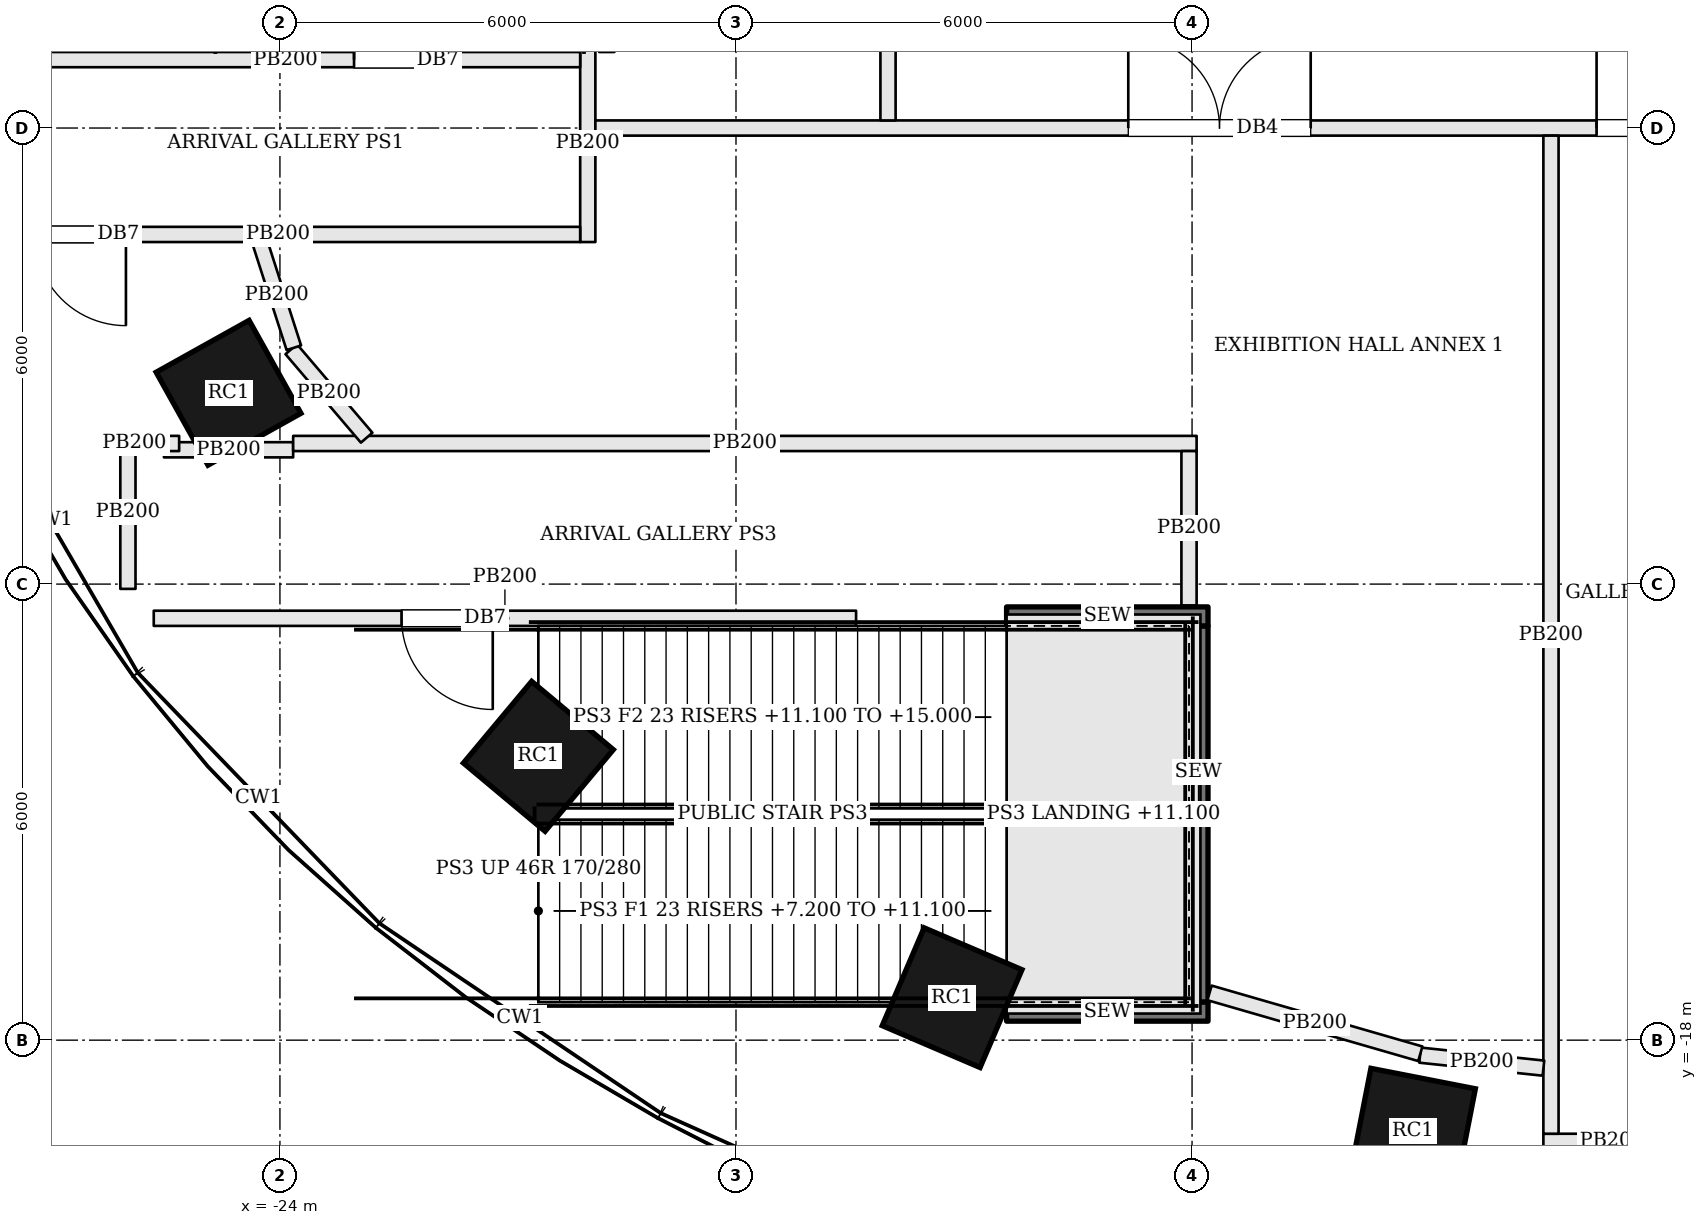
"""IFC4 building model, lengths in metres.
Left out: names, types, materials, properties, quantities, classifications, styles, units other than length and angle.
Written with IfcOpenShell. Run it as: python <this file> out.ifc"""

import sys

from ifc_helpers import new_model, si_unit, direction, frame, frame_2d, origin, origin_2d, place, context, subcontext, project, spatial, rectangle, extrude, element, fill, save


model = new_model("IFC4")
c1 = context("Model", 3, precision=1e-05, world=origin(), true_north=direction((0.0, 1.0)))
c2 = subcontext(c1, "Body", "Model", "MODEL_VIEW")
j1 = project(units=[si_unit("LENGTHUNIT", "METRE"), si_unit("PLANEANGLEUNIT", "RADIAN")], contexts=[c1])
p1 = place(None, origin())
s1 = spatial("IfcSite", under=j1, at=p1, CompositionType="ELEMENT")
p2 = place(p1, origin())
s2 = spatial("IfcBuilding", under=s1, at=p2, CompositionType="ELEMENT")
p3 = place(p2, frame((0.0, 0.0, 7.2)))
s3 = spatial("IfcBuildingStorey", under=s2, at=p3, CompositionType="ELEMENT", Elevation=7.2)
for number, where, z_axis, x_axis in (
    (1, (-24.676, -9.483, 0.0), (0.0, 0.0, 1.0), (0.487, -0.873, 0.0)),
    (2, (-20.6, -14.266, 0.0), (0.0, 0.0, 1.0), (0.767, -0.641, 0.0)),
    (3, (-15.157, -17.441, 0.0), (0.0, 0.0, 1.0), (0.919, -0.394, 0.0)),
    (4, (-9.094, -19.192, 0.0), (0.0, 0.0, 1.0), (0.981, -0.192, 0.0)),
):
    element("IfcColumn", number, at=place(p3, frame(where, z_axis=z_axis, x_axis=x_axis)), inside=s3, PredefinedType="COLUMN", context=c2, shape_type="SweptSolid", body=[
        extrude(rectangle(XDim=1.4, YDim=1.4, at=origin_2d()), origin(), (0.0, 0.0, 1.0), 7.8),
    ])
p4 = place(p3, frame((-19.95, -4.9, 0.0), z_axis=(0.0, 0.0, 1.0), x_axis=(0.0, -1.0, 0.0)))
e5 = element("IfcWall", 5, at=p4, inside=s3, PredefinedType="PARTITIONING", context=c2, shape_type="SweptSolid", body=[
    extrude(rectangle(XDim=2.6, YDim=0.2, at=frame_2d((1.3, 0.0))), origin(), (0.0, 0.0, 1.0), 6.83),
])
p5 = place(p3, frame((-20.05, -7.4, 0.0), z_axis=(0.0, 0.0, 1.0), x_axis=(-1.0, 0.0, 0.0)))
e6 = element("IfcWall", 6, at=p5, inside=s3, PredefinedType="PARTITIONING", context=c2, shape_type="SweptSolid", body=[
    extrude(rectangle(XDim=7.95, YDim=0.2, at=frame_2d((3.975, 0.0))), origin(), (0.0, 0.0, 1.0), 6.83),
])
p6 = place(p5, frame((5.976, 0.0, 0.0)))
e7 = element("IfcOpeningElement", 7, at=p6, cuts=e6, PredefinedType="OPENING", context=c2, shape_type="SweptSolid", body=[
    extrude(rectangle(XDim=1.2, YDim=2.1, at=frame_2d((0.6, 1.05))), frame((0.0, 0.11, 0.0), z_axis=(0.0, -1.0, 0.0), x_axis=(1.0, 0.0, 0.0)), (0.0, 0.0, 1.0), 0.22),
])
p7 = place(p3, frame((-27.8, -5.1, 0.0), z_axis=(0.0, 0.0, 1.0), x_axis=(1.0, 0.0, 0.0)))
e8 = element("IfcWall", 8, at=p7, inside=s3, PredefinedType="PARTITIONING", context=c2, shape_type="SweptSolid", body=[
    extrude(rectangle(XDim=7.75, YDim=0.2, at=frame_2d((3.875, 0.0))), origin(), (0.0, 0.0, 1.0), 6.83),
])
p8 = place(p7, frame((4.775, 0.0, 0.0)))
e9 = element("IfcOpeningElement", 9, at=p8, cuts=e8, PredefinedType="OPENING", context=c2, shape_type="SweptSolid", body=[
    extrude(rectangle(XDim=1.2, YDim=2.1, at=frame_2d((0.6, 1.05))), frame((0.0, 0.11, 0.0), z_axis=(0.0, -1.0, 0.0), x_axis=(1.0, 0.0, 0.0)), (0.0, 0.0, 1.0), 0.22),
])
p9 = place(p3, frame((-25.526, -10.233, 0.0), z_axis=(0.0, 0.0, 1.0), x_axis=(1.0, 0.0, 0.0)))
e10 = element("IfcWall", 10, at=p9, inside=s3, PredefinedType="PARTITIONING", context=c2, shape_type="SweptSolid", body=[
    extrude(rectangle(XDim=1.7, YDim=0.2, at=frame_2d((0.85, 0.0))), origin(), (0.0, 0.0, 1.0), 6.83),
])
p10 = place(p3, frame((-23.826, -10.15, 0.0), z_axis=(0.0, 0.0, 1.0), x_axis=(1.0, 0.0, 0.0)))
e11 = element("IfcWall", 11, at=p10, inside=s3, PredefinedType="PARTITIONING", context=c2, shape_type="SweptSolid", body=[
    extrude(rectangle(XDim=11.886, YDim=0.2, at=frame_2d((5.943, 0.0))), origin(), (0.0, 0.0, 1.0), 6.83),
])
p11 = place(p3, frame((-12.04, -10.25, 0.0), z_axis=(0.0, 0.0, 1.0), x_axis=(0.0, -1.0, 0.0)))
e12 = element("IfcWall", 12, at=p11, inside=s3, PredefinedType="PARTITIONING", context=c2, shape_type="SweptSolid", body=[
    extrude(rectangle(XDim=2.03, YDim=0.2, at=frame_2d((1.015, 0.0))), origin(), (0.0, 0.0, 1.0), 6.83),
])
p12 = place(p3, frame((-16.42, -12.45, 0.0), z_axis=(0.0, 0.0, 1.0), x_axis=(-1.0, 0.0, 0.0)))
e13 = element("IfcWall", 13, at=p12, inside=s3, PredefinedType="PARTITIONING", context=c2, shape_type="SweptSolid", body=[
    extrude(rectangle(XDim=9.24, YDim=0.2, at=frame_2d((4.62, 0.0))), origin(), (0.0, 0.0, 1.0), 6.83),
])
p13 = place(p12, frame((4.78, 0.0, 0.0)))
e14 = element("IfcOpeningElement", 14, at=p13, cuts=e13, PredefinedType="OPENING", context=c2, shape_type="SweptSolid", body=[
    extrude(rectangle(XDim=1.2, YDim=2.1, at=frame_2d((0.6, 1.05))), frame((0.0, 0.11, 0.0), z_axis=(0.0, -1.0, 0.0), x_axis=(1.0, 0.0, 0.0)), (0.0, 0.0, 1.0), 0.22),
])
p14 = place(p3, frame((-26.0, -12.063, 0.0), z_axis=(0.0, 0.0, 1.0), x_axis=(0.0, 1.0, 0.0)))
e15 = element("IfcWall", 15, at=p14, inside=s3, PredefinedType="PARTITIONING", context=c2, shape_type="SweptSolid", body=[
    extrude(rectangle(XDim=2.013, YDim=0.2, at=frame_2d((1.006, 0.0))), origin(), (0.0, 0.0, 1.0), 6.83),
])
p15 = place(p3, frame((-25.9, -10.15, 0.0), z_axis=(0.0, 0.0, 1.0), x_axis=(1.0, 0.0, 0.0)))
e16 = element("IfcWall", 16, at=p15, inside=s3, PredefinedType="PARTITIONING", context=c2, shape_type="SweptSolid", body=[
    extrude(rectangle(XDim=0.574, YDim=0.2, at=frame_2d((0.287, 0.0))), origin(), (0.0, 0.0, 1.0), 6.83),
])
p16 = place(p3, frame((-19.85, -6.0, 0.0), z_axis=(0.0, 0.0, 1.0), x_axis=(1.0, 0.0, 0.0)))
e17 = element("IfcWall", 17, at=p16, inside=s3, PredefinedType="PARTITIONING", context=c2, shape_type="SweptSolid", body=[
    extrude(rectangle(XDim=39.7, YDim=0.2, at=frame_2d((19.85, 0.0))), origin(), (0.0, 0.0, 1.0), 6.83),
])
p17 = place(p16, frame((13.172, 0.0, 0.0)))
e18 = element("IfcOpeningElement", 18, at=p17, cuts=e17, PredefinedType="OPENING", context=c2, shape_type="SweptSolid", body=[
    extrude(rectangle(XDim=1.2, YDim=2.1, at=frame_2d((0.6, 1.05))), frame((0.0, 0.11, 0.0), z_axis=(0.0, -1.0, 0.0), x_axis=(1.0, 0.0, 0.0)), (0.0, 0.0, 1.0), 0.22),
])
p18 = place(p16, frame((24.211, 0.0, 0.0)))
e19 = element("IfcOpeningElement", 19, at=p18, cuts=e17, PredefinedType="OPENING", context=c2, shape_type="SweptSolid", body=[
    extrude(rectangle(XDim=2.4, YDim=2.4, at=frame_2d((1.2, 1.2))), frame((0.0, 0.11, 0.0), z_axis=(0.0, -1.0, 0.0), x_axis=(1.0, 0.0, 0.0)), (0.0, 0.0, 1.0), 0.22),
])
p19 = place(p16, frame((7.011, 0.0, 0.0)))
e20 = element("IfcOpeningElement", 20, at=p19, cuts=e17, PredefinedType="OPENING", context=c2, shape_type="SweptSolid", body=[
    extrude(rectangle(XDim=2.4, YDim=2.4, at=frame_2d((1.2, 1.2))), frame((0.0, 0.11, 0.0), z_axis=(0.0, -1.0, 0.0), x_axis=(1.0, 0.0, 0.0)), (0.0, 0.0, 1.0), 0.22),
])
p20 = place(p3, frame((-4.978, -19.331, 0.0), z_axis=(0.0, 0.0, 1.0), x_axis=(-1.0, 0.0, 0.0)))
e21 = element("IfcWall", 21, at=p20, inside=s3, PredefinedType="PARTITIONING", context=c2, shape_type="SweptSolid", body=[
    extrude(rectangle(XDim=2.4, YDim=0.2, at=frame_2d((1.2, 0.0))), origin(), (0.0, 0.0, 1.0), 6.83),
])
p21 = place(p20, frame((0.5, 0.0, 0.0)))
e22 = element("IfcOpeningElement", 22, at=p21, cuts=e21, PredefinedType="OPENING", context=c2, shape_type="SweptSolid", body=[
    extrude(rectangle(XDim=1.2, YDim=2.1, at=frame_2d((0.6, 1.05))), frame((0.0, 0.11, 0.0), z_axis=(0.0, -1.0, 0.0), x_axis=(1.0, 0.0, 0.0)), (0.0, 0.0, 1.0), 0.22),
])
p22 = place(p3, frame((-7.278, -19.231, 0.0), z_axis=(0.0, 0.0, 1.0), x_axis=(0.0, 1.0, 0.0)))
e23 = element("IfcWall", 23, at=p22, inside=s3, PredefinedType="PARTITIONING", context=c2, shape_type="SweptSolid", body=[
    extrude(rectangle(XDim=13.131, YDim=0.2, at=frame_2d((6.565, 0.0))), origin(), (0.0, 0.0, 1.0), 6.83),
])
p23 = place(p3, frame((-16.0, 14.9, 0.0), z_axis=(0.0, 0.0, 1.0), x_axis=(0.0, -1.0, 0.0)))
e24 = element("IfcWall", 24, at=p23, inside=s3, PredefinedType="PARTITIONING", context=c2, shape_type="SweptSolid", body=[
    extrude(rectangle(XDim=20.8, YDim=0.2, at=frame_2d((10.4, 0.0))), origin(), (0.0, 0.0, 1.0), 6.83),
])
p24 = place(p23, frame((9.9, 0.0, 0.0)))
e25 = element("IfcOpeningElement", 25, at=p24, cuts=e24, PredefinedType="OPENING", context=c2, shape_type="SweptSolid", body=[
    extrude(rectangle(XDim=1.0, YDim=2.1, at=frame_2d((0.5, 1.05))), frame((0.0, 0.11, 0.0), z_axis=(0.0, -1.0, 0.0), x_axis=(1.0, 0.0, 0.0)), (0.0, 0.0, 1.0), 0.22),
])
p25 = place(p3, frame((-7.377, -18.368, 0.0), z_axis=(0.0, 0.0, 1.0), x_axis=(-0.994502173657, 0.104715932846, 0.0)))
e26 = element("IfcWall", 26, at=p25, inside=s3, PredefinedType="PARTITIONING", context=c2, shape_type="SweptSolid", body=[
    extrude(rectangle(XDim=1.632, YDim=0.2, at=frame_2d((0.816, 0.0))), origin(), (0.0, 0.0, 1.0), 6.83),
])
p26 = place(p3, frame((-8.997, -18.179, 0.0), z_axis=(0.0, 0.0, 1.0), x_axis=(-0.960718693411, 0.277524038834, 0.0)))
e27 = element("IfcWall", 27, at=p26, inside=s3, PredefinedType="PARTITIONING", context=c2, shape_type="SweptSolid", body=[
    extrude(rectangle(XDim=2.886, YDim=0.2, at=frame_2d((1.443, 0.0))), origin(), (0.0, 0.0, 1.0), 6.83),
])
p27 = place(p3, frame((-22.859, -10.074, 0.0), z_axis=(0.0, 0.0, 1.0), x_axis=(-0.648685680777, 0.761056428628, 0.0)))
e28 = element("IfcWall", 28, at=p27, inside=s3, PredefinedType="PARTITIONING", context=c2, shape_type="SweptSolid", body=[
    extrude(rectangle(XDim=1.53, YDim=0.2, at=frame_2d((0.765, 0.0))), origin(), (0.0, 0.0, 1.0), 6.83),
])
p28 = place(p3, frame((-23.817, -8.891, 0.0), z_axis=(0.0, 0.0, 1.0), x_axis=(-0.306321721395, 0.951928045076, 0.0)))
e29 = element("IfcWall", 29, at=p28, inside=s3, PredefinedType="PARTITIONING", context=c2, shape_type="SweptSolid", body=[
    extrude(rectangle(XDim=1.467, YDim=0.2, at=frame_2d((0.733, 0.0))), origin(), (0.0, 0.0, 1.0), 6.83),
])
p29 = place(p3, frame((-11.915, -17.5, 0.0), z_axis=(0.0, 0.0, 1.0), x_axis=(0.0, 1.0, 0.0)))
e30 = element("IfcWall", 30, at=p29, inside=s3, PredefinedType="SOLIDWALL", context=c2, shape_type="SweptSolid", body=[
    extrude(rectangle(XDim=4.95, YDim=0.25, at=frame_2d((2.475, 0.0))), origin(), (0.0, 0.0, 1.0), 7.55),
])
for number, where, z_axis, x_axis in (
    (31, (-14.44, -17.625, 0.0), (0.0, 0.0, 1.0), (1.0, 0.0, 0.0)),
    (32, (-14.44, -12.425, 0.0), (0.0, 0.0, 1.0), (1.0, 0.0, 0.0)),
):
    element("IfcWall", number, at=place(p3, frame(where, z_axis=z_axis, x_axis=x_axis)), inside=s3, PredefinedType="SOLIDWALL", context=c2, shape_type="SweptSolid", body=[
        extrude(rectangle(XDim=2.65, YDim=0.25, at=frame_2d((1.325, 0.0))), origin(), (0.0, 0.0, 1.0), 7.55),
    ])
p30 = place(p17, origin())
e33 = element("IfcDoor", 33, at=p30, inside=s3, OperationType="SINGLE_SWING_LEFT", PredefinedType="DOOR", context=c2, shape_type="SweptSolid", body=[
    extrude(rectangle(XDim=1.2, YDim=2.1, at=frame_2d((0.6, 1.05))), frame((0.0, 0.025, 0.0), z_axis=(0.0, -1.0, 0.0), x_axis=(1.0, 0.0, 0.0)), (0.0, 0.0, 1.0), 0.05),
])
fill(e18, e33)
p31 = place(p21, origin())
e34 = element("IfcDoor", 34, at=p31, inside=s3, OperationType="SINGLE_SWING_LEFT", PredefinedType="DOOR", context=c2, shape_type="SweptSolid", body=[
    extrude(rectangle(XDim=1.2, YDim=2.1, at=frame_2d((0.6, 1.05))), frame((0.0, 0.025, 0.0), z_axis=(0.0, -1.0, 0.0), x_axis=(1.0, 0.0, 0.0)), (0.0, 0.0, 1.0), 0.05),
])
fill(e22, e34)
p32 = place(p8, origin())
e35 = element("IfcDoor", 35, at=p32, inside=s3, OperationType="SINGLE_SWING_LEFT", PredefinedType="DOOR", context=c2, shape_type="SweptSolid", body=[
    extrude(rectangle(XDim=1.2, YDim=2.1, at=frame_2d((0.6, 1.05))), frame((0.0, 0.025, 0.0), z_axis=(0.0, -1.0, 0.0), x_axis=(1.0, 0.0, 0.0)), (0.0, 0.0, 1.0), 0.05),
])
fill(e9, e35)
p33 = place(p6, origin())
e36 = element("IfcDoor", 36, at=p33, inside=s3, OperationType="SINGLE_SWING_LEFT", PredefinedType="DOOR", context=c2, shape_type="SweptSolid", body=[
    extrude(rectangle(XDim=1.2, YDim=2.1, at=frame_2d((0.6, 1.05))), frame((0.0, 0.025, 0.0), z_axis=(0.0, -1.0, 0.0), x_axis=(1.0, 0.0, 0.0)), (0.0, 0.0, 1.0), 0.05),
])
fill(e7, e36)
p34 = place(p13, origin())
e37 = element("IfcDoor", 37, at=p34, inside=s3, OperationType="SINGLE_SWING_LEFT", PredefinedType="DOOR", context=c2, shape_type="SweptSolid", body=[
    extrude(rectangle(XDim=1.2, YDim=2.1, at=frame_2d((0.6, 1.05))), frame((0.0, 0.025, 0.0), z_axis=(0.0, -1.0, 0.0), x_axis=(1.0, 0.0, 0.0)), (0.0, 0.0, 1.0), 0.05),
])
fill(e14, e37)
p35 = place(p19, origin())
e38 = element("IfcDoor", 38, at=p35, inside=s3, OperationType="DOUBLE_DOOR_SINGLE_SWING", PredefinedType="DOOR", context=c2, shape_type="SweptSolid", body=[
    extrude(rectangle(XDim=2.4, YDim=2.4, at=frame_2d((1.2, 1.2))), frame((0.0, 0.025, 0.0), z_axis=(0.0, -1.0, 0.0), x_axis=(1.0, 0.0, 0.0)), (0.0, 0.0, 1.0), 0.05),
])
fill(e20, e38)
save(model, sys.argv[1])
